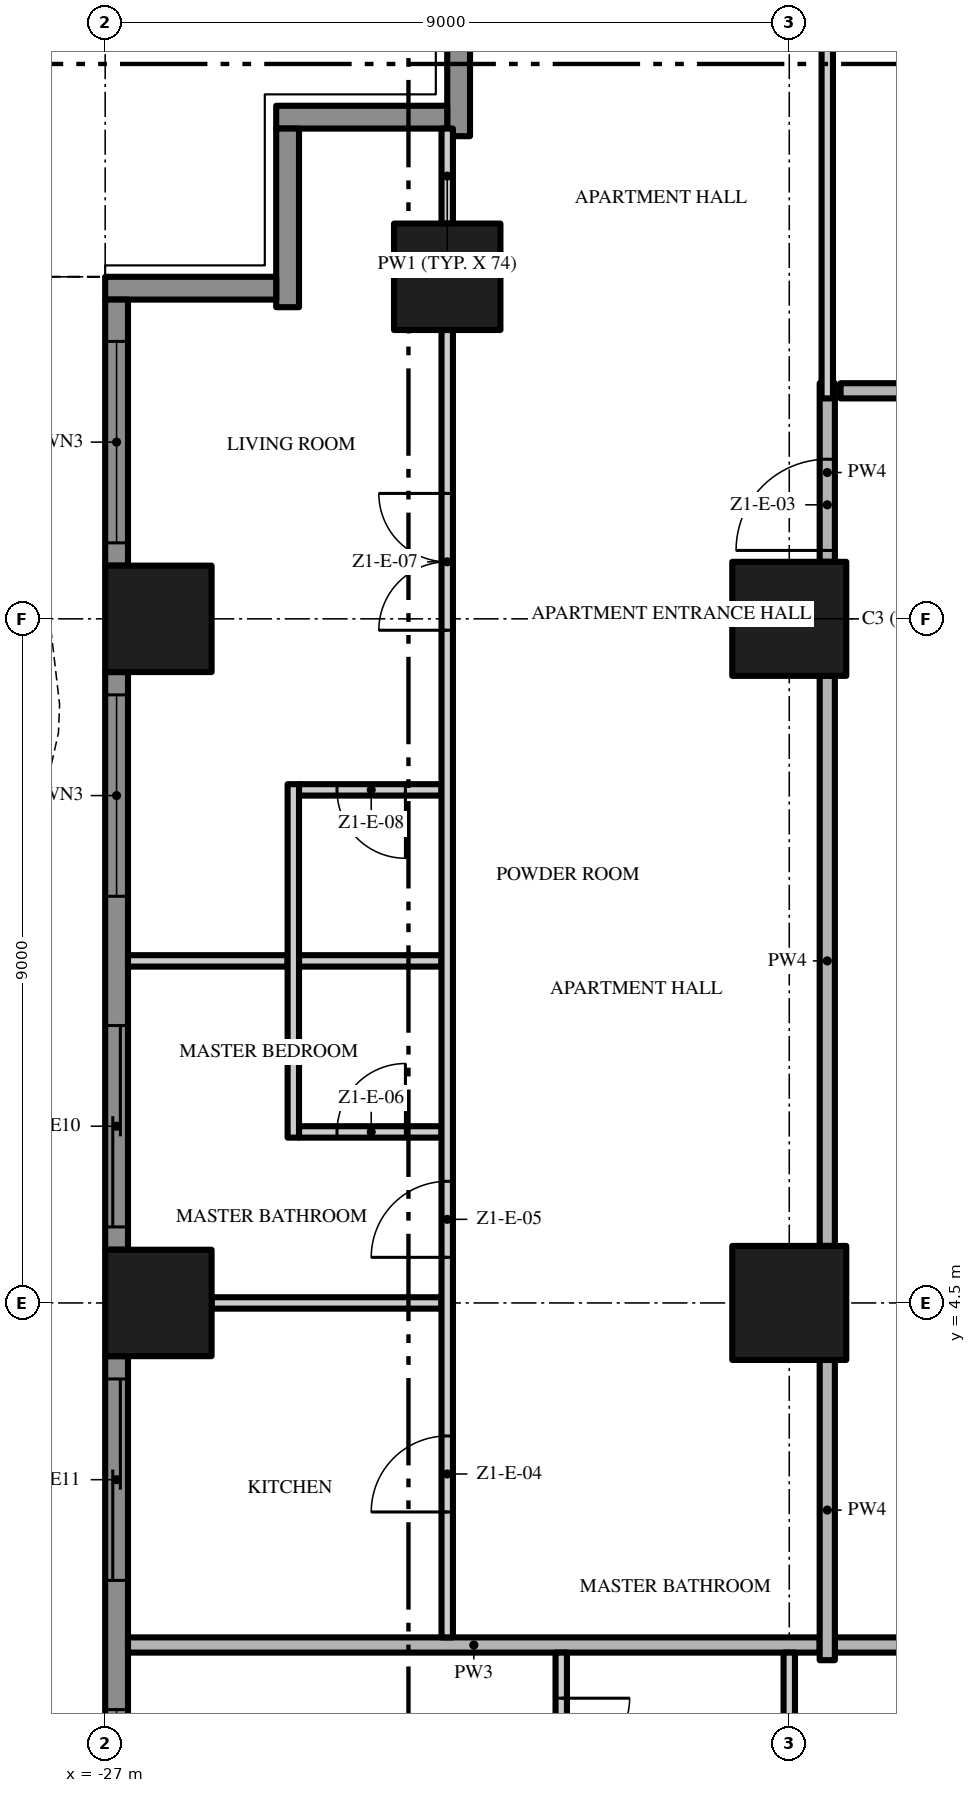
"""IFC4 building model, lengths in metres.
Left out: names, types, materials, properties, quantities, classifications, styles, units other than length and angle.
Written with IfcOpenShell. Run it as: python <this file> out.ifc"""

import sys

from ifc_helpers import new_model, si_unit, direction, frame, frame_2d, origin, origin_2d, place, context, subcontext, project, spatial, polyline, rectangle, outline, extrude, element, fill, save


model = new_model("IFC4")
c1 = context("Model", 3, precision=1e-05, world=origin(), true_north=direction((0.0, 1.0)))
c2 = subcontext(c1, "Body", "Model", "MODEL_VIEW")
j1 = project(units=[si_unit("LENGTHUNIT", "METRE"), si_unit("PLANEANGLEUNIT", "RADIAN")], contexts=[c1])
p1 = place(None, origin())
s1 = spatial("IfcSite", under=j1, at=p1, CompositionType="ELEMENT")
p2 = place(p1, origin())
s2 = spatial("IfcBuilding", under=s1, at=p2, CompositionType="ELEMENT")
p3 = place(p2, frame((0.0, 0.0, 56.8)))
s3 = spatial("IfcBuildingStorey", under=s2, at=p3, CompositionType="ELEMENT", Elevation=56.8)
for number, where, z_axis, x_axis in (
    (1, (-18.0, 13.5, 0.0), (0.0, 0.0, 1.0), (1.0, 0.0, 0.0)),
    (2, (-18.0, 4.5, 0.0), (0.0, 0.0, 1.0), (1.0, 0.0, 0.0)),
):
    element("IfcColumn", number, at=place(p3, frame(where, z_axis=z_axis, x_axis=x_axis)), inside=s3, PredefinedType="COLUMN", context=c2, shape_type="SweptSolid", body=[
        extrude(rectangle(XDim=1.5, YDim=1.5, at=origin_2d()), origin(), (0.0, 0.0, 1.0), 3.5),
    ])
for number, where, z_axis, x_axis in (
    (3, (-26.3, 13.5, 0.0), (0.0, 0.0, 1.0), (1.0, 0.0, 0.0)),
    (4, (-22.5, 18.0, 0.0), (0.0, 0.0, 1.0), (1.0, 0.0, 0.0)),
    (5, (-26.3, 4.5, 0.0), (0.0, 0.0, 1.0), (1.0, 0.0, 0.0)),
):
    element("IfcColumn", number, at=place(p3, frame(where, z_axis=z_axis, x_axis=x_axis)), inside=s3, PredefinedType="COLUMN", context=c2, shape_type="SweptSolid", body=[
        extrude(rectangle(XDim=1.4, YDim=1.4, at=origin_2d()), origin(), (0.0, 0.0, 1.0), 3.5),
    ])
p4 = place(p3, frame((-22.35, 19.85, 0.0), z_axis=(0.0, 0.0, 1.0), x_axis=(0.0, 1.0, 0.0)))
e6 = element("IfcWall", 6, at=p4, inside=s3, PredefinedType="SOLIDWALL", context=c2, shape_type="SweptSolid", body=[
    extrude(rectangle(XDim=2.35, YDim=0.3, at=frame_2d((1.175, 0.0))), origin(), (0.0, 0.0, 1.0), 3.5),
])
p5 = place(p3, frame((-24.75, 20.1, 0.0), z_axis=(0.0, 0.0, 1.0), x_axis=(1.0, 0.0, 0.0)))
e7 = element("IfcWall", 7, at=p5, inside=s3, PredefinedType="SOLIDWALL", context=c2, shape_type="SweptSolid", body=[
    extrude(rectangle(XDim=2.25, YDim=0.3, at=frame_2d((1.125, 0.0))), origin(), (0.0, 0.0, 1.0), 3.5),
])
p6 = place(p3, frame((-24.6, 17.6, 0.0), z_axis=(0.0, 0.0, 1.0), x_axis=(0.0, 1.0, 0.0)))
e8 = element("IfcWall", 8, at=p6, inside=s3, PredefinedType="SOLIDWALL", context=c2, shape_type="SweptSolid", body=[
    extrude(rectangle(XDim=2.35, YDim=0.3, at=frame_2d((1.175, 0.0))), origin(), (0.0, 0.0, 1.0), 3.5),
])
p7 = place(p3, frame((-27.0, 17.85, 0.0), z_axis=(0.0, 0.0, 1.0), x_axis=(1.0, 0.0, 0.0)))
e9 = element("IfcWall", 9, at=p7, inside=s3, PredefinedType="SOLIDWALL", context=c2, shape_type="SweptSolid", body=[
    extrude(rectangle(XDim=2.25, YDim=0.3, at=frame_2d((1.125, 0.0))), origin(), (0.0, 0.0, 1.0), 3.5),
])
p8 = place(p3, frame((-26.85, 14.2, 0.0), z_axis=(0.0, 0.0, 1.0), x_axis=(0.0, 1.0, 0.0)))
e10 = element("IfcWall", 10, at=p8, inside=s3, PredefinedType="SOLIDWALL", context=c2, shape_type="SweptSolid", body=[
    extrude(rectangle(XDim=3.5, YDim=0.3, at=frame_2d((1.75, 0.0))), origin(), (0.0, 0.0, 1.0), 3.5),
])
p9 = place(p8, frame((0.3, 0.0, 0.45)))
e11 = element("IfcOpeningElement", 11, at=p9, cuts=e10, PredefinedType="OPENING", context=c2, shape_type="SweptSolid", body=[
    extrude(rectangle(XDim=2.65, YDim=2.65, at=frame_2d((1.325, 1.325))), frame((0.0, 0.16, 0.0), z_axis=(0.0, -1.0, 0.0), x_axis=(1.0, 0.0, 0.0)), (0.0, 0.0, 1.0), 0.32),
])
p10 = place(p3, frame((-26.85, 5.2, 0.0), z_axis=(0.0, 0.0, 1.0), x_axis=(0.0, 1.0, 0.0)))
e12 = element("IfcWall", 12, at=p10, inside=s3, PredefinedType="SOLIDWALL", context=c2, shape_type="SweptSolid", body=[
    extrude(rectangle(XDim=7.6, YDim=0.3, at=frame_2d((3.8, 0.0))), origin(), (0.0, 0.0, 1.0), 3.5),
])
p11 = place(p10, frame((4.65, 0.0, 0.45)))
e13 = element("IfcOpeningElement", 13, at=p11, cuts=e12, PredefinedType="OPENING", context=c2, shape_type="SweptSolid", body=[
    extrude(rectangle(XDim=2.65, YDim=2.65, at=frame_2d((1.325, 1.325))), frame((0.0, 0.16, 0.0), z_axis=(0.0, -1.0, 0.0), x_axis=(1.0, 0.0, 0.0)), (0.0, 0.0, 1.0), 0.32),
])
p12 = place(p10, frame((0.3, 0.0, 0.0)))
e14 = element("IfcOpeningElement", 14, at=p12, cuts=e12, PredefinedType="OPENING", context=c2, shape_type="SweptSolid", body=[
    extrude(rectangle(XDim=2.65, YDim=2.4, at=frame_2d((1.325, 1.2))), frame((0.0, 0.16, 0.0), z_axis=(0.0, -1.0, 0.0), x_axis=(1.0, 0.0, 0.0)), (0.0, 0.0, 1.0), 0.32),
])
p13 = place(p3, frame((-26.85, -3.8, 0.0), z_axis=(0.0, 0.0, 1.0), x_axis=(0.0, 1.0, 0.0)))
e15 = element("IfcWall", 15, at=p13, inside=s3, PredefinedType="SOLIDWALL", context=c2, shape_type="SweptSolid", body=[
    extrude(rectangle(XDim=7.6, YDim=0.3, at=frame_2d((3.8, 0.0))), origin(), (0.0, 0.0, 1.0), 3.5),
])
p14 = place(p13, frame((4.65, 0.0, 0.0)))
e16 = element("IfcOpeningElement", 16, at=p14, cuts=e15, PredefinedType="OPENING", context=c2, shape_type="SweptSolid", body=[
    extrude(rectangle(XDim=2.65, YDim=2.4, at=frame_2d((1.325, 1.2))), frame((0.0, 0.16, 0.0), z_axis=(0.0, -1.0, 0.0), x_axis=(1.0, 0.0, 0.0)), (0.0, 0.0, 1.0), 0.32),
])
p15 = place(p13, frame((0.3, 0.0, 0.45)))
e17 = element("IfcOpeningElement", 17, at=p15, cuts=e15, PredefinedType="OPENING", context=c2, shape_type="SweptSolid", body=[
    extrude(rectangle(XDim=2.65, YDim=2.65, at=frame_2d((1.325, 1.325))), frame((0.0, 0.16, 0.0), z_axis=(0.0, -1.0, 0.0), x_axis=(1.0, 0.0, 0.0)), (0.0, 0.0, 1.0), 0.32),
])
p16 = place(p3, origin())
e18 = element("IfcWall", 18, at=p16, inside=s3, PredefinedType="USERDEFINED", context=c2, shape_type="SweptSolid", body=[
    extrude(outline(polyline([(-29.649, 18.0), (-28.988, 16.5), (-28.255, 15.0), (-27.731, 13.5), (-27.6, 12.375), (-27.615, 12.0), (-27.951, 10.5), (-28.612, 9.0), (-29.345, 7.5), (-29.869, 6.0), (-30.0, 4.875), (-29.985, 4.5), (-29.649, 3.0), (-28.988, 1.5), (-28.255, 0.0), (-27.731, -1.5), (-27.6, -2.625), (-27.615, -3.0), (-27.951, -4.5), (-28.612, -6.0), (-29.345, -7.5), (-29.869, -9.0), (-30.0, -10.125), (-29.985, -10.5), (-29.649, -12.0), (-28.988, -13.5), (-28.255, -15.0), (-27.731, -16.5), (-27.6, -17.625), (-27.615, -18.0), (-27.365, -18.01), (-27.349, -17.615), (-27.486, -16.444), (-28.024, -14.904), (-28.761, -13.395), (-29.41, -11.921), (-29.736, -10.467), (-29.749, -10.135), (-29.624, -9.056), (-29.114, -7.596), (-28.385, -6.105), (-27.713, -4.579), (-27.366, -3.033), (-27.349, -2.615), (-27.486, -1.444), (-28.024, 0.096), (-28.761, 1.605), (-29.41, 3.079), (-29.736, 4.533), (-29.749, 4.865), (-29.624, 5.944), (-29.114, 7.404), (-28.385, 8.895), (-27.713, 10.421), (-27.366, 11.967), (-27.349, 12.385), (-27.486, 13.556), (-28.024, 15.096), (-28.761, 16.605), (-29.42, 18.101), (-29.649, 18.0)])), origin(), (0.0, 0.0, 1.0), 0.9),
])
p17 = place(p3, frame((-17.4, 0.0, 0.0), z_axis=(0.0, 0.0, 1.0), x_axis=(1.0, 0.0, 0.0)))
e19 = element("IfcWall", 19, at=p17, inside=s3, PredefinedType="PARTITIONING", context=c2, shape_type="SweptSolid", body=[
    extrude(rectangle(XDim=12.8, YDim=0.2, at=frame_2d((6.4, 0.0))), origin(), (0.0, 0.0, 1.0), 3.5),
])
p18 = place(p3, frame((-26.7, 0.0, 0.0), z_axis=(0.0, 0.0, 1.0), x_axis=(1.0, 0.0, 0.0)))
e20 = element("IfcWall", 20, at=p18, inside=s3, PredefinedType="PARTITIONING", context=c2, shape_type="SweptSolid", body=[
    extrude(rectangle(XDim=9.1, YDim=0.2, at=frame_2d((4.55, 0.0))), origin(), (0.0, 0.0, 1.0), 3.5),
])
p19 = place(p3, frame((-25.6, 4.5, 0.0), z_axis=(0.0, 0.0, 1.0), x_axis=(1.0, 0.0, 0.0)))
e21 = element("IfcWall", 21, at=p19, inside=s3, PredefinedType="PARTITIONING", context=c2, shape_type="SweptSolid", body=[
    extrude(rectangle(XDim=3.025, YDim=0.15, at=frame_2d((1.512, 0.0))), origin(), (0.0, 0.0, 1.0), 3.5),
])
p20 = place(p3, frame((-24.45, 6.75, 0.0), z_axis=(0.0, 0.0, 1.0), x_axis=(1.0, 0.0, 0.0)))
e22 = element("IfcWall", 22, at=p20, inside=s3, PredefinedType="PARTITIONING", context=c2, shape_type="SweptSolid", body=[
    extrude(rectangle(XDim=1.875, YDim=0.15, at=frame_2d((0.938, 0.0))), origin(), (0.0, 0.0, 1.0), 3.5),
])
p21 = place(p20, frame((0.5, 0.0, 0.0)))
e23 = element("IfcOpeningElement", 23, at=p21, cuts=e22, PredefinedType="OPENING", context=c2, shape_type="SweptSolid", body=[
    extrude(rectangle(XDim=0.9, YDim=2.1, at=frame_2d((0.45, 1.05))), frame((0.0, 0.085, 0.0), z_axis=(0.0, -1.0, 0.0), x_axis=(1.0, 0.0, 0.0)), (0.0, 0.0, 1.0), 0.17),
])
p22 = place(p3, frame((-26.7, 9.0, 0.0), z_axis=(0.0, 0.0, 1.0), x_axis=(1.0, 0.0, 0.0)))
e24 = element("IfcWall", 24, at=p22, inside=s3, PredefinedType="PARTITIONING", context=c2, shape_type="SweptSolid", body=[
    extrude(rectangle(XDim=2.1, YDim=0.15, at=frame_2d((1.05, 0.0))), origin(), (0.0, 0.0, 1.0), 3.5),
])
p23 = place(p3, frame((-24.45, 9.0, 0.0), z_axis=(0.0, 0.0, 1.0), x_axis=(1.0, 0.0, 0.0)))
e25 = element("IfcWall", 25, at=p23, inside=s3, PredefinedType="PARTITIONING", context=c2, shape_type="SweptSolid", body=[
    extrude(rectangle(XDim=1.875, YDim=0.15, at=frame_2d((0.938, 0.0))), origin(), (0.0, 0.0, 1.0), 3.5),
])
p24 = place(p3, frame((-22.575, 11.25, 0.0), z_axis=(0.0, 0.0, 1.0), x_axis=(-1.0, 0.0, 0.0)))
e26 = element("IfcWall", 26, at=p24, inside=s3, PredefinedType="PARTITIONING", context=c2, shape_type="SweptSolid", body=[
    extrude(rectangle(XDim=1.875, YDim=0.15, at=frame_2d((0.938, 0.0))), origin(), (0.0, 0.0, 1.0), 3.5),
])
p25 = place(p24, frame((0.475, 0.0, 0.0)))
e27 = element("IfcOpeningElement", 27, at=p25, cuts=e26, PredefinedType="OPENING", context=c2, shape_type="SweptSolid", body=[
    extrude(rectangle(XDim=0.9, YDim=2.1, at=frame_2d((0.45, 1.05))), frame((0.0, 0.085, 0.0), z_axis=(0.0, -1.0, 0.0), x_axis=(1.0, 0.0, 0.0)), (0.0, 0.0, 1.0), 0.17),
])
p26 = place(p3, frame((-17.325, 16.5, 0.0), z_axis=(0.0, 0.0, 1.0), x_axis=(1.0, 0.0, 0.0)))
e28 = element("IfcWall", 28, at=p26, inside=s3, PredefinedType="PARTITIONING", context=c2, shape_type="SweptSolid", body=[
    extrude(rectangle(XDim=3.825, YDim=0.2, at=frame_2d((1.913, 0.0))), origin(), (0.0, 0.0, 1.0), 3.5),
])
p27 = place(p26, frame((1.35, 0.0, 0.0)))
e29 = element("IfcOpeningElement", 29, at=p27, cuts=e28, PredefinedType="OPENING", context=c2, shape_type="SweptSolid", body=[
    extrude(rectangle(XDim=0.9, YDim=2.1, at=frame_2d((0.45, 1.05))), frame((0.0, 0.11, 0.0), z_axis=(0.0, -1.0, 0.0), x_axis=(1.0, 0.0, 0.0)), (0.0, 0.0, 1.0), 0.22),
])
p28 = place(p3, frame((-24.525, 6.675, 0.0), z_axis=(0.0, 0.0, 1.0), x_axis=(0.0, 1.0, 0.0)))
e30 = element("IfcWall", 30, at=p28, inside=s3, PredefinedType="PARTITIONING", context=c2, shape_type="SweptSolid", body=[
    extrude(rectangle(XDim=4.65, YDim=0.15, at=frame_2d((2.325, 0.0))), origin(), (0.0, 0.0, 1.0), 3.5),
])
p29 = place(p3, frame((-22.5, 0.1, 0.0), z_axis=(0.0, 0.0, 1.0), x_axis=(0.0, 1.0, 0.0)))
e31 = element("IfcWall", 31, at=p29, inside=s3, PredefinedType="PARTITIONING", context=c2, shape_type="SweptSolid", body=[
    extrude(rectangle(XDim=17.2, YDim=0.15, at=frame_2d((8.6, 0.0))), origin(), (0.0, 0.0, 1.0), 3.5),
])
p30 = place(p29, frame((1.65, 0.0, 0.0)))
e32 = element("IfcOpeningElement", 32, at=p30, cuts=e31, PredefinedType="OPENING", context=c2, shape_type="SweptSolid", body=[
    extrude(rectangle(XDim=1.0, YDim=2.4, at=frame_2d((0.5, 1.2))), frame((0.0, 0.085, 0.0), z_axis=(0.0, -1.0, 0.0), x_axis=(1.0, 0.0, 0.0)), (0.0, 0.0, 1.0), 0.17),
])
p31 = place(p29, frame((5.0, 0.0, 0.0)))
e33 = element("IfcOpeningElement", 33, at=p31, cuts=e31, PredefinedType="OPENING", context=c2, shape_type="SweptSolid", body=[
    extrude(rectangle(XDim=1.0, YDim=2.4, at=frame_2d((0.5, 1.2))), frame((0.0, 0.085, 0.0), z_axis=(0.0, -1.0, 0.0), x_axis=(1.0, 0.0, 0.0)), (0.0, 0.0, 1.0), 0.17),
])
p32 = place(p29, frame((13.25, 0.0, 0.0)))
e34 = element("IfcOpeningElement", 34, at=p32, cuts=e31, PredefinedType="OPENING", context=c2, shape_type="SweptSolid", body=[
    extrude(rectangle(XDim=1.8, YDim=2.4, at=frame_2d((0.9, 1.2))), frame((0.0, 0.085, 0.0), z_axis=(0.0, -1.0, 0.0), x_axis=(1.0, 0.0, 0.0)), (0.0, 0.0, 1.0), 0.17),
])
p33 = place(p3, frame((-22.5, 18.7, 0.0), z_axis=(0.0, 0.0, 1.0), x_axis=(0.0, 1.0, 0.0)))
e35 = element("IfcWall", 35, at=p33, inside=s3, PredefinedType="PARTITIONING", context=c2, shape_type="SweptSolid", body=[
    extrude(rectangle(XDim=1.25, YDim=0.15, at=frame_2d((0.625, 0.0))), origin(), (0.0, 0.0, 1.0), 3.5),
])
p34 = place(p3, frame((-21.0, -0.1, 0.0), z_axis=(0.0, 0.0, 1.0), x_axis=(0.0, -1.0, 0.0)))
e36 = element("IfcWall", 36, at=p34, inside=s3, PredefinedType="PARTITIONING", context=c2, shape_type="SweptSolid", body=[
    extrude(rectangle(XDim=2.225, YDim=0.15, at=frame_2d((1.113, 0.0))), origin(), (0.0, 0.0, 1.0), 3.5),
])
p35 = place(p34, frame((0.6, 0.0, 0.0)))
e37 = element("IfcOpeningElement", 37, at=p35, cuts=e36, PredefinedType="OPENING", context=c2, shape_type="SweptSolid", body=[
    extrude(rectangle(XDim=0.9, YDim=2.1, at=frame_2d((0.45, 1.05))), frame((0.0, 0.085, 0.0), z_axis=(0.0, -1.0, 0.0), x_axis=(1.0, 0.0, 0.0)), (0.0, 0.0, 1.0), 0.17),
])
p36 = place(p3, frame((-18.0, -3.75, 0.0), z_axis=(0.0, 0.0, 1.0), x_axis=(0.0, 1.0, 0.0)))
e38 = element("IfcWall", 38, at=p36, inside=s3, PredefinedType="PARTITIONING", context=c2, shape_type="SweptSolid", body=[
    extrude(rectangle(XDim=3.65, YDim=0.15, at=frame_2d((1.825, 0.0))), origin(), (0.0, 0.0, 1.0), 3.5),
])
p37 = place(p36, frame((0.15, 0.0, 0.0)))
e39 = element("IfcOpeningElement", 39, at=p37, cuts=e38, PredefinedType="OPENING", context=c2, shape_type="SweptSolid", body=[
    extrude(rectangle(XDim=1.0, YDim=2.4, at=frame_2d((0.5, 1.2))), frame((0.0, 0.085, 0.0), z_axis=(0.0, -1.0, 0.0), x_axis=(1.0, 0.0, 0.0)), (0.0, 0.0, 1.0), 0.17),
])
p38 = place(p3, frame((-17.5, -0.2, 0.0), z_axis=(0.0, 0.0, 1.0), x_axis=(0.0, 1.0, 0.0)))
e40 = element("IfcWall", 40, at=p38, inside=s3, PredefinedType="PARTITIONING", context=c2, shape_type="SweptSolid", body=[
    extrude(rectangle(XDim=3.95, YDim=0.2, at=frame_2d((1.975, 0.0))), origin(), (0.0, 0.0, 1.0), 3.5),
])
p39 = place(p3, frame((-17.5, 5.25, 0.0), z_axis=(0.0, 0.0, 1.0), x_axis=(0.0, 1.0, 0.0)))
e41 = element("IfcWall", 41, at=p39, inside=s3, PredefinedType="PARTITIONING", context=c2, shape_type="SweptSolid", body=[
    extrude(rectangle(XDim=7.5, YDim=0.2, at=frame_2d((3.75, 0.0))), origin(), (0.0, 0.0, 1.0), 3.5),
])
p40 = place(p3, frame((-17.5, 14.25, 0.0), z_axis=(0.0, 0.0, 1.0), x_axis=(0.0, 1.0, 0.0)))
e42 = element("IfcWall", 42, at=p40, inside=s3, PredefinedType="PARTITIONING", context=c2, shape_type="SweptSolid", body=[
    extrude(rectangle(XDim=2.35, YDim=0.2, at=frame_2d((1.175, 0.0))), origin(), (0.0, 0.0, 1.0), 3.5),
])
p41 = place(p40, frame((0.15, 0.0, 0.0)))
e43 = element("IfcOpeningElement", 43, at=p41, cuts=e42, PredefinedType="OPENING", context=c2, shape_type="SweptSolid", body=[
    extrude(rectangle(XDim=1.2, YDim=2.4, at=frame_2d((0.6, 1.2))), frame((0.0, 0.11, 0.0), z_axis=(0.0, -1.0, 0.0), x_axis=(1.0, 0.0, 0.0)), (0.0, 0.0, 1.0), 0.22),
])
p42 = place(p3, frame((-17.5, 16.4, 0.0), z_axis=(0.0, 0.0, 1.0), x_axis=(0.0, 1.0, 0.0)))
e44 = element("IfcWall", 44, at=p42, inside=s3, PredefinedType="PARTITIONING", context=c2, shape_type="SweptSolid", body=[
    extrude(rectangle(XDim=4.7, YDim=0.15, at=frame_2d((2.35, 0.0))), origin(), (0.0, 0.0, 1.0), 3.5),
])
p43 = place(p9, origin())
e45 = element("IfcWindow", 45, at=p43, inside=s3, PartitioningType="SINGLE_PANEL", PredefinedType="WINDOW", context=c2, shape_type="SweptSolid", body=[
    extrude(rectangle(XDim=2.65, YDim=2.65, at=frame_2d((1.325, 1.325))), frame((0.0, 0.03, 0.0), z_axis=(0.0, -1.0, 0.0), x_axis=(1.0, 0.0, 0.0)), (0.0, 0.0, 1.0), 0.06),
])
fill(e11, e45)
p44 = place(p11, origin())
e46 = element("IfcWindow", 46, at=p44, inside=s3, PartitioningType="SINGLE_PANEL", PredefinedType="WINDOW", context=c2, shape_type="SweptSolid", body=[
    extrude(rectangle(XDim=2.65, YDim=2.65, at=frame_2d((1.325, 1.325))), frame((0.0, 0.03, 0.0), z_axis=(0.0, -1.0, 0.0), x_axis=(1.0, 0.0, 0.0)), (0.0, 0.0, 1.0), 0.06),
])
fill(e13, e46)
p45 = place(p12, origin())
e47 = element("IfcDoor", 47, at=p45, inside=s3, OperationType="SINGLE_SWING_LEFT", PredefinedType="DOOR", context=c2, shape_type="SweptSolid", body=[
    extrude(rectangle(XDim=2.65, YDim=2.4, at=frame_2d((1.325, 1.2))), frame((0.0, 0.025, 0.0), z_axis=(0.0, -1.0, 0.0), x_axis=(1.0, 0.0, 0.0)), (0.0, 0.0, 1.0), 0.05),
])
fill(e14, e47)
p46 = place(p14, origin())
e48 = element("IfcDoor", 48, at=p46, inside=s3, OperationType="SINGLE_SWING_LEFT", PredefinedType="DOOR", context=c2, shape_type="SweptSolid", body=[
    extrude(rectangle(XDim=2.65, YDim=2.4, at=frame_2d((1.325, 1.2))), frame((0.0, 0.025, 0.0), z_axis=(0.0, -1.0, 0.0), x_axis=(1.0, 0.0, 0.0)), (0.0, 0.0, 1.0), 0.05),
])
fill(e16, e48)
p47 = place(p15, origin())
e49 = element("IfcWindow", 49, at=p47, inside=s3, PartitioningType="SINGLE_PANEL", PredefinedType="WINDOW", context=c2, shape_type="SweptSolid", body=[
    extrude(rectangle(XDim=2.65, YDim=2.65, at=frame_2d((1.325, 1.325))), frame((0.0, 0.03, 0.0), z_axis=(0.0, -1.0, 0.0), x_axis=(1.0, 0.0, 0.0)), (0.0, 0.0, 1.0), 0.06),
])
fill(e17, e49)
p48 = place(p41, origin())
e50 = element("IfcDoor", 50, at=p48, inside=s3, OperationType="SINGLE_SWING_LEFT", PredefinedType="DOOR", context=c2, shape_type="SweptSolid", body=[
    extrude(rectangle(XDim=1.2, YDim=2.4, at=frame_2d((0.6, 1.2))), frame((0.0, 0.025, 0.0), z_axis=(0.0, -1.0, 0.0), x_axis=(1.0, 0.0, 0.0)), (0.0, 0.0, 1.0), 0.05),
])
fill(e43, e50)
p49 = place(p30, origin())
e51 = element("IfcDoor", 51, at=p49, inside=s3, OperationType="SINGLE_SWING_LEFT", PredefinedType="DOOR", context=c2, shape_type="SweptSolid", body=[
    extrude(rectangle(XDim=1.0, YDim=2.4, at=frame_2d((0.5, 1.2))), frame((0.0, 0.025, 0.0), z_axis=(0.0, -1.0, 0.0), x_axis=(1.0, 0.0, 0.0)), (0.0, 0.0, 1.0), 0.05),
])
fill(e32, e51)
p50 = place(p31, origin())
e52 = element("IfcDoor", 52, at=p50, inside=s3, OperationType="SINGLE_SWING_LEFT", PredefinedType="DOOR", context=c2, shape_type="SweptSolid", body=[
    extrude(rectangle(XDim=1.0, YDim=2.4, at=frame_2d((0.5, 1.2))), frame((0.0, 0.025, 0.0), z_axis=(0.0, -1.0, 0.0), x_axis=(1.0, 0.0, 0.0)), (0.0, 0.0, 1.0), 0.05),
])
fill(e33, e52)
p51 = place(p21, origin())
e53 = element("IfcDoor", 53, at=p51, inside=s3, OperationType="SINGLE_SWING_RIGHT", PredefinedType="DOOR", context=c2, shape_type="SweptSolid", body=[
    extrude(rectangle(XDim=0.9, YDim=2.1, at=frame_2d((0.45, 1.05))), frame((0.0, 0.025, 0.0), z_axis=(0.0, -1.0, 0.0), x_axis=(1.0, 0.0, 0.0)), (0.0, 0.0, 1.0), 0.05),
])
fill(e23, e53)
p52 = place(p32, origin())
e54 = element("IfcDoor", 54, at=p52, inside=s3, OperationType="DOUBLE_DOOR_SINGLE_SWING", PredefinedType="DOOR", context=c2, shape_type="SweptSolid", body=[
    extrude(rectangle(XDim=1.8, YDim=2.4, at=frame_2d((0.9, 1.2))), frame((0.0, 0.025, 0.0), z_axis=(0.0, -1.0, 0.0), x_axis=(1.0, 0.0, 0.0)), (0.0, 0.0, 1.0), 0.05),
])
fill(e34, e54)
p53 = place(p25, origin())
e55 = element("IfcDoor", 55, at=p53, inside=s3, OperationType="SINGLE_SWING_LEFT", PredefinedType="DOOR", context=c2, shape_type="SweptSolid", body=[
    extrude(rectangle(XDim=0.9, YDim=2.1, at=frame_2d((0.45, 1.05))), frame((0.0, 0.025, 0.0), z_axis=(0.0, -1.0, 0.0), x_axis=(1.0, 0.0, 0.0)), (0.0, 0.0, 1.0), 0.05),
])
fill(e27, e55)
p54 = place(p35, origin())
e56 = element("IfcDoor", 56, at=p54, inside=s3, OperationType="SINGLE_SWING_LEFT", PredefinedType="DOOR", context=c2, shape_type="SweptSolid", body=[
    extrude(rectangle(XDim=0.9, YDim=2.1, at=frame_2d((0.45, 1.05))), frame((0.0, 0.025, 0.0), z_axis=(0.0, -1.0, 0.0), x_axis=(1.0, 0.0, 0.0)), (0.0, 0.0, 1.0), 0.05),
])
fill(e37, e56)
save(model, sys.argv[1])
